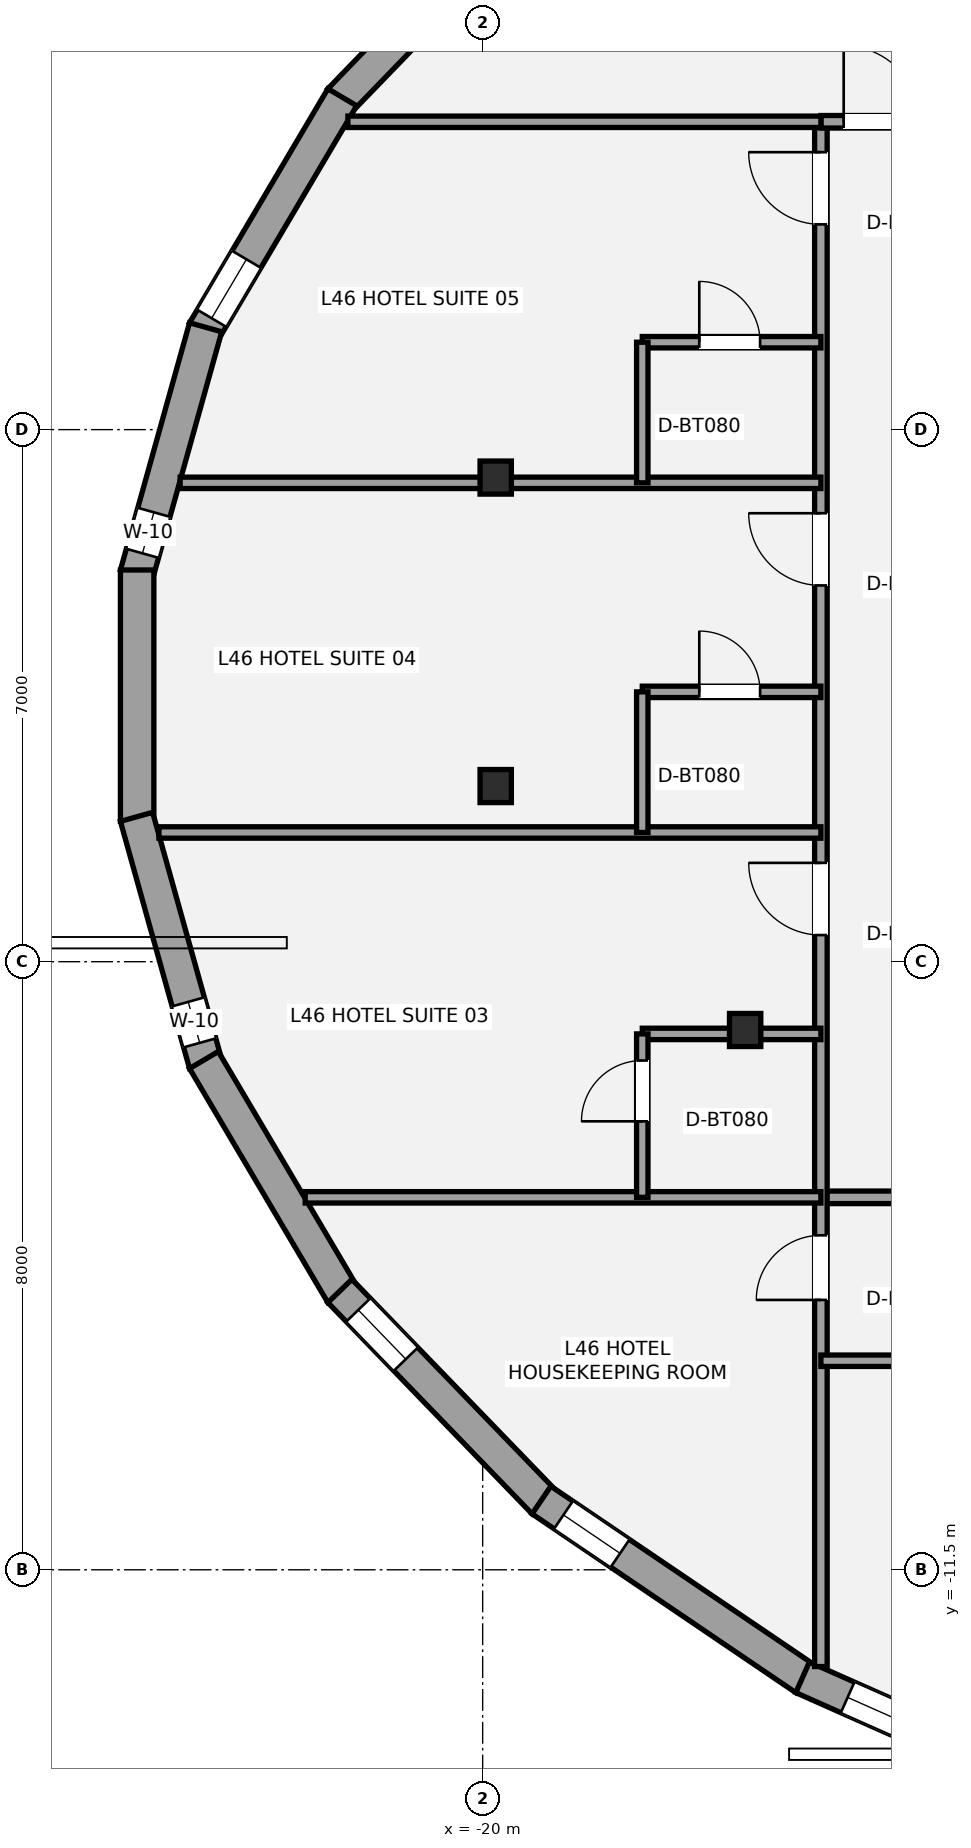
"""IFC4 building model, lengths in metres.
Left out: names, types, materials, properties, quantities, classifications, styles, units other than length and angle.
Written with IfcOpenShell. Run it as: python <this file> out.ifc"""

import sys

from ifc_helpers import new_model, si_unit, direction, frame, frame_2d, origin, origin_2d, place, context, subcontext, project, spatial, rectangle, i_section, extrude, element, fill, save


model = new_model("IFC4")
c1 = context("Model", 3, precision=1e-05, world=origin(), true_north=direction((0.0, 1.0)))
c2 = subcontext(c1, "Body", "Model", "MODEL_VIEW")
j1 = project(units=[si_unit("LENGTHUNIT", "METRE"), si_unit("PLANEANGLEUNIT", "RADIAN")], contexts=[c1])
p1 = place(None, origin())
s1 = spatial("IfcSite", under=j1, at=p1, CompositionType="ELEMENT")
p2 = place(p1, origin())
s2 = spatial("IfcBuilding", under=s1, at=p2, CompositionType="ELEMENT")
p3 = place(p2, frame((0.0, 0.0, 169.4)))
s3 = spatial("IfcBuildingStorey", under=s2, at=p3, CompositionType="ELEMENT", Elevation=169.4)
for number, where, z_axis, x_axis in (
    (1, (-19.828, 2.869, 0.0), (0.0, 0.0, 1.0), (1.0, 0.0, 0.0)),
    (2, (-19.828, -1.189, 0.0), (0.0, 0.0, 1.0), (1.0, 0.0, 0.0)),
    (3, (-16.547, -4.398, 0.0), (0.0, 0.0, 1.0), (1.0, 0.0, 0.0)),
):
    element("IfcColumn", number, at=place(p3, frame(where, z_axis=z_axis, x_axis=x_axis)), inside=s3, PredefinedType="COLUMN", context=c2, shape_type="SweptSolid", body=[
        extrude(i_section(OverallWidth=0.412, OverallDepth=0.435, WebThickness=0.036, FlangeThickness=0.057, at=origin_2d()), origin(), (0.0, 0.0, 1.0), 3.2),
    ])
p4 = place(p3, frame((-21.879, 7.832, 0.0), z_axis=(0.0, 0.0, 1.0), x_axis=(0.694975307772, 0.719033602544, 0.0)))
e4 = element("IfcWall", 4, at=p4, inside=s3, PredefinedType="STANDARD", context=c2, shape_type="SweptSolid", body=[
    extrude(rectangle(XDim=3.866, YDim=0.44, at=frame_2d((1.933, 0.0))), origin(), (0.0, 0.0, 1.0), 2.315),
])
p5 = place(p3, frame((-23.667, 4.794, 0.0), z_axis=(0.0, 0.0, 1.0), x_axis=(0.508883387051, 0.860835465338, 0.0)))
e5 = element("IfcWall", 5, at=p5, inside=s3, PredefinedType="STANDARD", context=c2, shape_type="SweptSolid", body=[
    extrude(rectangle(XDim=3.577, YDim=0.44, at=frame_2d((1.788, 0.0))), origin(), (0.0, 0.0, 1.0), 2.315),
])
p6 = place(p5, frame((0.2, 0.0, 0.42)))
e6 = element("IfcOpeningElement", 6, at=p6, cuts=e5, PredefinedType="OPENING", context=c2, shape_type="SweptSolid", body=[
    extrude(rectangle(XDim=0.9, YDim=1.35, at=frame_2d((0.45, 0.675))), frame((0.0, 0.23, 0.0), z_axis=(0.0, -1.0, 0.0), x_axis=(1.0, 0.0, 0.0)), (0.0, 0.0, 1.0), 0.46),
])
p7 = place(p3, frame((-24.554, 1.594, 0.0), z_axis=(0.0, 0.0, 1.0), x_axis=(0.269235699479, 0.963074315993, 0.0)))
e7 = element("IfcWall", 7, at=p7, inside=s3, PredefinedType="STANDARD", context=c2, shape_type="SweptSolid", body=[
    extrude(rectangle(XDim=3.377, YDim=0.44, at=frame_2d((1.688, 0.0))), origin(), (0.0, 0.0, 1.0), 2.315),
])
p8 = place(p7, frame((0.289, 0.0, 0.58)))
e8 = element("IfcOpeningElement", 8, at=p8, cuts=e7, PredefinedType="OPENING", context=c2, shape_type="SweptSolid", body=[
    extrude(rectangle(XDim=0.56, YDim=1.15, at=frame_2d((0.28, 0.575))), frame((0.0, 0.23, 0.0), z_axis=(0.0, -1.0, 0.0), x_axis=(1.0, 0.0, 0.0)), (0.0, 0.0, 1.0), 0.46),
])
p9 = place(p3, frame((-24.546, -1.654, 0.0), z_axis=(0.0, 0.0, 1.0), x_axis=(0.0, 1.0, 0.0)))
e9 = element("IfcWall", 9, at=p9, inside=s3, PredefinedType="STANDARD", context=c2, shape_type="SweptSolid", body=[
    extrude(rectangle(XDim=3.307, YDim=0.44, at=frame_2d((1.654, 0.0))), origin(), (0.0, 0.0, 1.0), 2.315),
])
p10 = place(p3, frame((-23.645, -4.846, 0.0), z_axis=(0.0, 0.0, 1.0), x_axis=(-0.269235699479, 0.963074315993, 0.0)))
e10 = element("IfcWall", 10, at=p10, inside=s3, PredefinedType="STANDARD", context=c2, shape_type="SweptSolid", body=[
    extrude(rectangle(XDim=3.377, YDim=0.44, at=frame_2d((1.688, 0.0))), origin(), (0.0, 0.0, 1.0), 2.315),
])
p11 = place(p10, frame((0.289, 0.0, 0.58)))
e11 = element("IfcOpeningElement", 11, at=p11, cuts=e10, PredefinedType="OPENING", context=c2, shape_type="SweptSolid", body=[
    extrude(rectangle(XDim=0.56, YDim=1.15, at=frame_2d((0.28, 0.575))), frame((0.0, 0.23, 0.0), z_axis=(0.0, -1.0, 0.0), x_axis=(1.0, 0.0, 0.0)), (0.0, 0.0, 1.0), 0.46),
])
p12 = place(p3, frame((-21.847, -7.873, 0.0), z_axis=(0.0, 0.0, 1.0), x_axis=(-0.508883387051, 0.860835465338, 0.0)))
e12 = element("IfcWall", 12, at=p12, inside=s3, PredefinedType="STANDARD", context=c2, shape_type="SweptSolid", body=[
    extrude(rectangle(XDim=3.577, YDim=0.44, at=frame_2d((1.788, 0.0))), origin(), (0.0, 0.0, 1.0), 2.315),
])
p13 = place(p3, frame((-19.192, -10.612, 0.0), z_axis=(0.0, 0.0, 1.0), x_axis=(-0.694975307772, 0.719033602544, 0.0)))
e13 = element("IfcWall", 13, at=p13, inside=s3, PredefinedType="STANDARD", context=c2, shape_type="SweptSolid", body=[
    extrude(rectangle(XDim=3.866, YDim=0.44, at=frame_2d((1.933, 0.0))), origin(), (0.0, 0.0, 1.0), 2.315),
])
p14 = place(p13, frame((2.618, 0.0, 0.58)))
e14 = element("IfcOpeningElement", 14, at=p14, cuts=e13, PredefinedType="OPENING", context=c2, shape_type="SweptSolid", body=[
    extrude(rectangle(XDim=0.9, YDim=1.35, at=frame_2d((0.45, 0.675))), frame((0.0, 0.23, 0.0), z_axis=(0.0, -1.0, 0.0), x_axis=(1.0, 0.0, 0.0)), (0.0, 0.0, 1.0), 0.46),
])
p15 = place(p3, frame((-15.757, -12.935, 0.0), z_axis=(0.0, 0.0, 1.0), x_axis=(-0.827760762475, 0.561081206338, 0.0)))
e15 = element("IfcWall", 15, at=p15, inside=s3, PredefinedType="STANDARD", context=c2, shape_type="SweptSolid", body=[
    extrude(rectangle(XDim=4.192, YDim=0.44, at=frame_2d((2.096, 0.0))), origin(), (0.0, 0.0, 1.0), 2.319),
])
p16 = place(p15, frame((2.942, 0.0, 0.58)))
e16 = element("IfcOpeningElement", 16, at=p16, cuts=e15, PredefinedType="OPENING", context=c2, shape_type="SweptSolid", body=[
    extrude(rectangle(XDim=0.9, YDim=1.35, at=frame_2d((0.45, 0.675))), frame((0.0, 0.23, 0.0), z_axis=(0.0, -1.0, 0.0), x_axis=(1.0, 0.0, 0.0)), (0.0, 0.0, 1.0), 0.46),
])
p17 = place(p3, frame((-11.69, -14.737, 0.0), z_axis=(0.0, 0.0, 1.0), x_axis=(-0.913907994914, 0.405921392431, 0.0)))
e17 = element("IfcWall", 17, at=p17, inside=s3, PredefinedType="STANDARD", context=c2, shape_type="SweptSolid", body=[
    extrude(rectangle(XDim=4.487, YDim=0.44, at=frame_2d((2.244, 0.0))), origin(), (0.0, 0.0, 1.0), 2.315),
])
p18 = place(p17, frame((2.939, 0.0, 0.58)))
e18 = element("IfcOpeningElement", 18, at=p18, cuts=e17, PredefinedType="OPENING", context=c2, shape_type="SweptSolid", body=[
    extrude(rectangle(XDim=0.9, YDim=1.35, at=frame_2d((0.45, 0.675))), frame((0.0, 0.23, 0.0), z_axis=(0.0, -1.0, 0.0), x_axis=(1.0, 0.0, 0.0)), (0.0, 0.0, 1.0), 0.46),
])
p19 = place(p3, frame((-15.55, -6.6, 0.0), z_axis=(0.0, 0.0, 1.0), x_axis=(1.0, 0.0, 0.0)))
e19 = element("IfcWall", 19, at=p19, inside=s3, PredefinedType="PARTITIONING", context=c2, shape_type="SweptSolid", body=[
    extrude(rectangle(XDim=31.65, YDim=0.165, at=frame_2d((15.825, 0.0))), origin(), (0.0, 0.0, 1.0), 2.398),
])
p20 = place(p19, frame((14.7, 0.0, 0.0)))
e20 = element("IfcOpeningElement", 20, at=p20, cuts=e19, PredefinedType="OPENING", context=c2, shape_type="SweptSolid", body=[
    extrude(rectangle(XDim=0.95, YDim=2.15, at=frame_2d((0.475, 1.075))), frame((0.0, 0.093, 0.0), z_axis=(0.0, -1.0, 0.0), x_axis=(1.0, 0.0, 0.0)), (0.0, 0.0, 1.0), 0.185),
])
p21 = place(p19, frame((30.3, 0.0, 0.0)))
e21 = element("IfcOpeningElement", 21, at=p21, cuts=e19, PredefinedType="OPENING", context=c2, shape_type="SweptSolid", body=[
    extrude(rectangle(XDim=0.95, YDim=2.15, at=frame_2d((0.475, 1.075))), frame((0.0, 0.093, 0.0), z_axis=(0.0, -1.0, 0.0), x_axis=(1.0, 0.0, 0.0)), (0.0, 0.0, 1.0), 0.185),
])
p22 = place(p3, frame((-15.55, -12.773, 0.0), z_axis=(0.0, 0.0, 1.0), x_axis=(0.0, 1.0, 0.0)))
e22 = element("IfcWall", 22, at=p22, inside=s3, PredefinedType="PARTITIONING", context=c2, shape_type="SweptSolid", body=[
    extrude(rectangle(XDim=20.323, YDim=0.165, at=frame_2d((10.162, 0.0))), origin(), (0.0, 0.0, 1.0), 2.473),
])
p23 = place(p22, frame((4.823, 0.0, 0.0)))
e23 = element("IfcOpeningElement", 23, at=p23, cuts=e22, PredefinedType="OPENING", context=c2, shape_type="SweptSolid", body=[
    extrude(rectangle(XDim=0.85, YDim=2.1, at=frame_2d((0.425, 1.05))), frame((0.0, 0.093, 0.0), z_axis=(0.0, -1.0, 0.0), x_axis=(1.0, 0.0, 0.0)), (0.0, 0.0, 1.0), 0.185),
])
p24 = place(p22, frame((9.623, 0.0, 0.0)))
e24 = element("IfcOpeningElement", 24, at=p24, cuts=e22, PredefinedType="OPENING", context=c2, shape_type="SweptSolid", body=[
    extrude(rectangle(XDim=0.95, YDim=2.15, at=frame_2d((0.475, 1.075))), frame((0.0, 0.093, 0.0), z_axis=(0.0, -1.0, 0.0), x_axis=(1.0, 0.0, 0.0)), (0.0, 0.0, 1.0), 0.185),
])
p25 = place(p22, frame((14.223, 0.0, 0.0)))
e25 = element("IfcOpeningElement", 25, at=p25, cuts=e22, PredefinedType="OPENING", context=c2, shape_type="SweptSolid", body=[
    extrude(rectangle(XDim=0.95, YDim=2.15, at=frame_2d((0.475, 1.075))), frame((0.0, 0.093, 0.0), z_axis=(0.0, -1.0, 0.0), x_axis=(1.0, 0.0, 0.0)), (0.0, 0.0, 1.0), 0.185),
])
p26 = place(p22, frame((18.973, 0.0, 0.0)))
e26 = element("IfcOpeningElement", 26, at=p26, cuts=e22, PredefinedType="OPENING", context=c2, shape_type="SweptSolid", body=[
    extrude(rectangle(XDim=0.95, YDim=2.15, at=frame_2d((0.475, 1.075))), frame((0.0, 0.093, 0.0), z_axis=(0.0, -1.0, 0.0), x_axis=(1.0, 0.0, 0.0)), (0.0, 0.0, 1.0), 0.185),
])
p27 = place(p3, frame((-15.55, 7.55, 0.0), z_axis=(0.0, 0.0, 1.0), x_axis=(1.0, 0.0, 0.0)))
e27 = element("IfcWall", 27, at=p27, inside=s3, PredefinedType="PARTITIONING", context=c2, shape_type="SweptSolid", body=[
    extrude(rectangle(XDim=1.75, YDim=0.165, at=frame_2d((0.875, 0.0))), origin(), (0.0, 0.0, 1.0), 3.02),
])
p28 = place(p27, frame((0.3, 0.0, 0.0)))
e28 = element("IfcOpeningElement", 28, at=p28, cuts=e27, PredefinedType="OPENING", context=c2, shape_type="SweptSolid", body=[
    extrude(rectangle(XDim=1.0, YDim=2.15, at=frame_2d((0.5, 1.075))), frame((0.0, 0.093, 0.0), z_axis=(0.0, -1.0, 0.0), x_axis=(1.0, 0.0, 0.0)), (0.0, 0.0, 1.0), 0.185),
])
p29 = place(p3, frame((-21.773, 7.55, 0.0), z_axis=(0.0, 0.0, 1.0), x_axis=(1.0, 0.0, 0.0)))
e29 = element("IfcWall", 29, at=p29, inside=s3, PredefinedType="PLUMBINGWALL", context=c2, shape_type="SweptSolid", body=[
    extrude(rectangle(XDim=6.223, YDim=0.15, at=frame_2d((3.112, 0.0))), origin(), (0.0, 0.0, 1.0), 2.473),
])
p30 = place(p3, frame((-22.335, -6.6, 0.0), z_axis=(0.0, 0.0, 1.0), x_axis=(1.0, 0.0, 0.0)))
e30 = element("IfcWall", 30, at=p30, inside=s3, PredefinedType="PLUMBINGWALL", context=c2, shape_type="SweptSolid", body=[
    extrude(rectangle(XDim=6.785, YDim=0.15, at=frame_2d((3.392, 0.0))), origin(), (0.0, 0.0, 1.0), 2.473),
])
p31 = place(p3, frame((-15.55, -8.75, 0.0), z_axis=(0.0, 0.0, 1.0), x_axis=(1.0, 0.0, 0.0)))
e31 = element("IfcWall", 31, at=p31, inside=s3, PredefinedType="PLUMBINGWALL", context=c2, shape_type="SweptSolid", body=[
    extrude(rectangle(XDim=1.85, YDim=0.15, at=frame_2d((0.925, 0.0))), origin(), (0.0, 0.0, 1.0), 2.473),
])
p32 = place(p3, frame((-24.26, -1.8, 0.0), z_axis=(0.0, 0.0, 1.0), x_axis=(1.0, 0.0, 0.0)))
e32 = element("IfcWall", 32, at=p32, inside=s3, PredefinedType="PLUMBINGWALL", context=c2, shape_type="SweptSolid", body=[
    extrude(rectangle(XDim=8.71, YDim=0.15, at=frame_2d((4.355, 0.0))), origin(), (0.0, 0.0, 1.0), 2.398),
])
p33 = place(p3, frame((-23.98, 2.8, 0.0), z_axis=(0.0, 0.0, 1.0), x_axis=(1.0, 0.0, 0.0)))
e33 = element("IfcWall", 33, at=p33, inside=s3, PredefinedType="PLUMBINGWALL", context=c2, shape_type="SweptSolid", body=[
    extrude(rectangle(XDim=8.43, YDim=0.15, at=frame_2d((4.215, 0.0))), origin(), (0.0, 0.0, 1.0), 2.473),
])
p34 = place(p3, frame((-17.9, -4.45, 0.0), z_axis=(0.0, 0.0, 1.0), x_axis=(1.0, 0.0, 0.0)))
e34 = element("IfcWall", 34, at=p34, inside=s3, PredefinedType="PLUMBINGWALL", context=c2, shape_type="SweptSolid", body=[
    extrude(rectangle(XDim=2.35, YDim=0.15, at=frame_2d((1.175, 0.0))), origin(), (0.0, 0.0, 1.0), 2.398),
])
p35 = place(p3, frame((-17.9, -6.6, 0.0), z_axis=(0.0, 0.0, 1.0), x_axis=(0.0, 1.0, 0.0)))
e35 = element("IfcWall", 35, at=p35, inside=s3, PredefinedType="PLUMBINGWALL", context=c2, shape_type="SweptSolid", body=[
    extrude(rectangle(XDim=2.15, YDim=0.15, at=frame_2d((1.075, 0.0))), origin(), (0.0, 0.0, 1.0), 2.473),
])
p36 = place(p35, frame((1.0, 0.0, 0.0)))
e36 = element("IfcOpeningElement", 36, at=p36, cuts=e35, PredefinedType="OPENING", context=c2, shape_type="SweptSolid", body=[
    extrude(rectangle(XDim=0.8, YDim=2.1, at=frame_2d((0.4, 1.05))), frame((0.0, 0.085, 0.0), z_axis=(0.0, -1.0, 0.0), x_axis=(1.0, 0.0, 0.0)), (0.0, 0.0, 1.0), 0.17),
])
p37 = place(p3, frame((-17.9, 0.05, 0.0), z_axis=(0.0, 0.0, 1.0), x_axis=(1.0, 0.0, 0.0)))
e37 = element("IfcWall", 37, at=p37, inside=s3, PredefinedType="PLUMBINGWALL", context=c2, shape_type="SweptSolid", body=[
    extrude(rectangle(XDim=2.35, YDim=0.15, at=frame_2d((1.175, 0.0))), origin(), (0.0, 0.0, 1.0), 2.473),
])
p38 = place(p37, frame((0.75, 0.0, 0.0)))
e38 = element("IfcOpeningElement", 38, at=p38, cuts=e37, PredefinedType="OPENING", context=c2, shape_type="SweptSolid", body=[
    extrude(rectangle(XDim=0.8, YDim=2.1, at=frame_2d((0.4, 1.05))), frame((0.0, 0.085, 0.0), z_axis=(0.0, -1.0, 0.0), x_axis=(1.0, 0.0, 0.0)), (0.0, 0.0, 1.0), 0.17),
])
p39 = place(p3, frame((-17.9, -1.8, 0.0), z_axis=(0.0, 0.0, 1.0), x_axis=(0.0, 1.0, 0.0)))
e39 = element("IfcWall", 39, at=p39, inside=s3, PredefinedType="PLUMBINGWALL", context=c2, shape_type="SweptSolid", body=[
    extrude(rectangle(XDim=1.85, YDim=0.15, at=frame_2d((0.925, 0.0))), origin(), (0.0, 0.0, 1.0), 3.02),
])
p40 = place(p3, frame((-17.9, 4.65, 0.0), z_axis=(0.0, 0.0, 1.0), x_axis=(1.0, 0.0, 0.0)))
e40 = element("IfcWall", 40, at=p40, inside=s3, PredefinedType="PLUMBINGWALL", context=c2, shape_type="SweptSolid", body=[
    extrude(rectangle(XDim=2.35, YDim=0.15, at=frame_2d((1.175, 0.0))), origin(), (0.0, 0.0, 1.0), 2.473),
])
p41 = place(p40, frame((0.75, 0.0, 0.0)))
e41 = element("IfcOpeningElement", 41, at=p41, cuts=e40, PredefinedType="OPENING", context=c2, shape_type="SweptSolid", body=[
    extrude(rectangle(XDim=0.8, YDim=2.1, at=frame_2d((0.4, 1.05))), frame((0.0, 0.085, 0.0), z_axis=(0.0, -1.0, 0.0), x_axis=(1.0, 0.0, 0.0)), (0.0, 0.0, 1.0), 0.17),
])
p42 = place(p3, frame((-17.9, 2.8, 0.0), z_axis=(0.0, 0.0, 1.0), x_axis=(0.0, 1.0, 0.0)))
e42 = element("IfcWall", 42, at=p42, inside=s3, PredefinedType="PLUMBINGWALL", context=c2, shape_type="SweptSolid", body=[
    extrude(rectangle(XDim=1.85, YDim=0.15, at=frame_2d((0.925, 0.0))), origin(), (0.0, 0.0, 1.0), 2.473),
])
p43 = place(p6, origin())
e43 = element("IfcWindow", 43, at=p43, inside=s3, PartitioningType="SINGLE_PANEL", PredefinedType="WINDOW", context=c2, shape_type="SweptSolid", body=[
    extrude(rectangle(XDim=0.9, YDim=1.35, at=frame_2d((0.45, 0.675))), frame((0.0, -0.01, 0.0), z_axis=(0.0, -1.0, 0.0), x_axis=(1.0, 0.0, 0.0)), (0.0, 0.0, 1.0), 0.06),
])
fill(e6, e43)
p44 = place(p14, origin())
e44 = element("IfcWindow", 44, at=p44, inside=s3, PartitioningType="SINGLE_PANEL", PredefinedType="WINDOW", context=c2, shape_type="SweptSolid", body=[
    extrude(rectangle(XDim=0.9, YDim=1.35, at=frame_2d((0.45, 0.675))), frame((0.0, -0.01, 0.0), z_axis=(0.0, -1.0, 0.0), x_axis=(1.0, 0.0, 0.0)), (0.0, 0.0, 1.0), 0.06),
])
fill(e14, e44)
p45 = place(p16, origin())
e45 = element("IfcWindow", 45, at=p45, inside=s3, PartitioningType="SINGLE_PANEL", PredefinedType="WINDOW", context=c2, shape_type="SweptSolid", body=[
    extrude(rectangle(XDim=0.9, YDim=1.35, at=frame_2d((0.45, 0.675))), frame((0.0, -0.01, 0.0), z_axis=(0.0, -1.0, 0.0), x_axis=(1.0, 0.0, 0.0)), (0.0, 0.0, 1.0), 0.06),
])
fill(e16, e45)
p46 = place(p18, origin())
e46 = element("IfcWindow", 46, at=p46, inside=s3, PartitioningType="SINGLE_PANEL", PredefinedType="WINDOW", context=c2, shape_type="SweptSolid", body=[
    extrude(rectangle(XDim=0.9, YDim=1.35, at=frame_2d((0.45, 0.675))), frame((0.0, -0.01, 0.0), z_axis=(0.0, -1.0, 0.0), x_axis=(1.0, 0.0, 0.0)), (0.0, 0.0, 1.0), 0.06),
])
fill(e18, e46)
p47 = place(p11, origin())
e47 = element("IfcWindow", 47, at=p47, inside=s3, PartitioningType="SINGLE_PANEL", PredefinedType="WINDOW", context=c2, shape_type="SweptSolid", body=[
    extrude(rectangle(XDim=0.56, YDim=1.15, at=frame_2d((0.28, 0.575))), frame((0.0, -0.01, 0.0), z_axis=(0.0, -1.0, 0.0), x_axis=(1.0, 0.0, 0.0)), (0.0, 0.0, 1.0), 0.06),
])
fill(e11, e47)
p48 = place(p8, origin())
e48 = element("IfcWindow", 48, at=p48, inside=s3, PartitioningType="SINGLE_PANEL", PredefinedType="WINDOW", context=c2, shape_type="SweptSolid", body=[
    extrude(rectangle(XDim=0.56, YDim=1.15, at=frame_2d((0.28, 0.575))), frame((0.0, -0.01, 0.0), z_axis=(0.0, -1.0, 0.0), x_axis=(1.0, 0.0, 0.0)), (0.0, 0.0, 1.0), 0.06),
])
fill(e8, e48)
p49 = place(p28, origin())
e49 = element("IfcDoor", 49, at=p49, inside=s3, OperationType="SINGLE_SWING_LEFT", PredefinedType="DOOR", context=c2, shape_type="SweptSolid", body=[
    extrude(rectangle(XDim=1.0, YDim=2.15, at=frame_2d((0.5, 1.075))), frame((0.0, 0.025, 0.0), z_axis=(0.0, -1.0, 0.0), x_axis=(1.0, 0.0, 0.0)), (0.0, 0.0, 1.0), 0.05),
])
fill(e28, e49)
p50 = place(p23, origin())
e50 = element("IfcDoor", 50, at=p50, inside=s3, OperationType="SINGLE_SWING_LEFT", PredefinedType="DOOR", context=c2, shape_type="SweptSolid", body=[
    extrude(rectangle(XDim=0.85, YDim=2.1, at=frame_2d((0.425, 1.05))), frame((0.0, 0.025, 0.0), z_axis=(0.0, -1.0, 0.0), x_axis=(1.0, 0.0, 0.0)), (0.0, 0.0, 1.0), 0.05),
])
fill(e23, e50)
p51 = place(p24, origin())
e51 = element("IfcDoor", 51, at=p51, inside=s3, OperationType="SINGLE_SWING_RIGHT", PredefinedType="DOOR", context=c2, shape_type="SweptSolid", body=[
    extrude(rectangle(XDim=0.95, YDim=2.15, at=frame_2d((0.475, 1.075))), frame((0.0, 0.025, 0.0), z_axis=(0.0, -1.0, 0.0), x_axis=(1.0, 0.0, 0.0)), (0.0, 0.0, 1.0), 0.05),
])
fill(e24, e51)
p52 = place(p36, origin())
e52 = element("IfcDoor", 52, at=p52, inside=s3, OperationType="SINGLE_SWING_LEFT", PredefinedType="DOOR", context=c2, shape_type="SweptSolid", body=[
    extrude(rectangle(XDim=0.8, YDim=2.1, at=frame_2d((0.4, 1.05))), frame((0.0, 0.025, 0.0), z_axis=(0.0, -1.0, 0.0), x_axis=(1.0, 0.0, 0.0)), (0.0, 0.0, 1.0), 0.05),
])
fill(e36, e52)
p53 = place(p25, origin())
e53 = element("IfcDoor", 53, at=p53, inside=s3, OperationType="SINGLE_SWING_RIGHT", PredefinedType="DOOR", context=c2, shape_type="SweptSolid", body=[
    extrude(rectangle(XDim=0.95, YDim=2.15, at=frame_2d((0.475, 1.075))), frame((0.0, 0.025, 0.0), z_axis=(0.0, -1.0, 0.0), x_axis=(1.0, 0.0, 0.0)), (0.0, 0.0, 1.0), 0.05),
])
fill(e25, e53)
p54 = place(p38, origin())
e54 = element("IfcDoor", 54, at=p54, inside=s3, OperationType="SINGLE_SWING_LEFT", PredefinedType="DOOR", context=c2, shape_type="SweptSolid", body=[
    extrude(rectangle(XDim=0.8, YDim=2.1, at=frame_2d((0.4, 1.05))), frame((0.0, 0.025, 0.0), z_axis=(0.0, -1.0, 0.0), x_axis=(1.0, 0.0, 0.0)), (0.0, 0.0, 1.0), 0.05),
])
fill(e38, e54)
p55 = place(p26, origin())
e55 = element("IfcDoor", 55, at=p55, inside=s3, OperationType="SINGLE_SWING_RIGHT", PredefinedType="DOOR", context=c2, shape_type="SweptSolid", body=[
    extrude(rectangle(XDim=0.95, YDim=2.15, at=frame_2d((0.475, 1.075))), frame((0.0, 0.025, 0.0), z_axis=(0.0, -1.0, 0.0), x_axis=(1.0, 0.0, 0.0)), (0.0, 0.0, 1.0), 0.05),
])
fill(e26, e55)
p56 = place(p41, origin())
e56 = element("IfcDoor", 56, at=p56, inside=s3, OperationType="SINGLE_SWING_LEFT", PredefinedType="DOOR", context=c2, shape_type="SweptSolid", body=[
    extrude(rectangle(XDim=0.8, YDim=2.1, at=frame_2d((0.4, 1.05))), frame((0.0, 0.025, 0.0), z_axis=(0.0, -1.0, 0.0), x_axis=(1.0, 0.0, 0.0)), (0.0, 0.0, 1.0), 0.05),
])
fill(e41, e56)
save(model, sys.argv[1])
